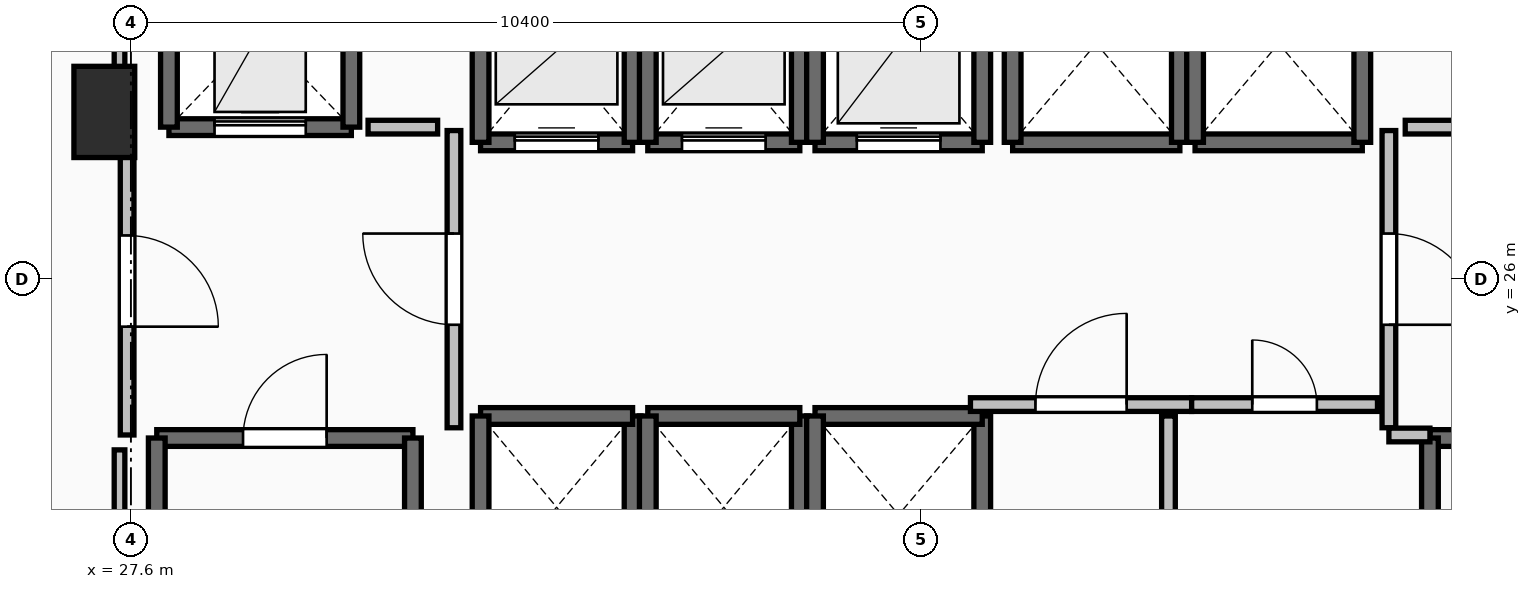
"""IFC4 building model, lengths in metres.
Left out: names, types, materials, properties, quantities, classifications, styles, units other than length and angle.
Written with IfcOpenShell. Run it as: python <this file> out.ifc"""

import sys

from ifc_helpers import new_model, si_unit, direction, frame, frame_2d, origin, origin_2d, place, context, subcontext, project, spatial, rectangle, extrude, element, fill, save


model = new_model("IFC4")
c1 = context("Model", 3, precision=1e-05, world=origin(), true_north=direction((0.0, 1.0)))
c2 = subcontext(c1, "Body", "Model", "MODEL_VIEW")
j1 = project(units=[si_unit("LENGTHUNIT", "METRE"), si_unit("PLANEANGLEUNIT", "RADIAN")], contexts=[c1])
p1 = place(None, origin())
s1 = spatial("IfcSite", under=j1, at=p1, CompositionType="ELEMENT")
p2 = place(p1, origin())
s2 = spatial("IfcBuilding", under=s1, at=p2, CompositionType="ELEMENT")
p3 = place(p2, frame((0.0, 0.0, 19.2)))
s3 = spatial("IfcBuildingStorey", under=s2, at=p3, CompositionType="ELEMENT", Elevation=19.2)
p4 = place(p3, frame((27.25, 28.2, 0.0), z_axis=(0.0, 0.0, 1.0), x_axis=(1.0, 0.0, 0.0)))
e1 = element("IfcColumn", 1, at=p4, inside=s3, PredefinedType="PILASTER", context=c2, shape_type="SweptSolid", body=[
    extrude(rectangle(XDim=0.8, YDim=1.2, at=origin_2d()), origin(), (0.0, 0.0, 1.0), 4.8),
])
p5 = place(p3, frame((27.94, 23.91, 0.0), z_axis=(0.0, 0.0, 1.0), x_axis=(1.0, 0.0, 0.0)))
e2 = element("IfcWall", 2, at=p5, inside=s3, PredefinedType="SOLIDWALL", context=c2, shape_type="SweptSolid", body=[
    extrude(rectangle(XDim=3.37, YDim=0.22, at=frame_2d((1.685, 0.0))), origin(), (0.0, 0.0, 1.0), 4.54),
])
p6 = place(p5, frame((1.135, 0.0, 0.0)))
e3 = element("IfcOpeningElement", 3, at=p6, cuts=e2, PredefinedType="OPENING", context=c2, shape_type="SweptSolid", body=[
    extrude(rectangle(XDim=1.1, YDim=2.15, at=frame_2d((0.55, 1.075))), frame((0.0, 0.125, 0.0), z_axis=(0.0, -1.0, 0.0), x_axis=(1.0, 0.0, 0.0)), (0.0, 0.0, 1.0), 0.25),
])
for number, where, z_axis, x_axis in (
    (4, (31.31, 23.91, 0.0), (0.0, 0.0, 1.0), (0.0, -1.0, 0.0)),
    (5, (27.94, 16.49, 0.0), (0.0, 0.0, 1.0), (0.0, 1.0, 0.0)),
):
    element("IfcWall", number, at=place(p3, frame(where, z_axis=z_axis, x_axis=x_axis)), inside=s3, PredefinedType="SOLIDWALL", context=c2, shape_type="SweptSolid", body=[
        extrude(rectangle(XDim=7.42, YDim=0.22, at=frame_2d((3.71, 0.0))), origin(), (0.0, 0.0, 1.0), 4.54),
    ])
p7 = place(p3, frame((44.69, 23.91, 0.0), z_axis=(0.0, 0.0, 1.0), x_axis=(1.0, 0.0, 0.0)))
e6 = element("IfcWall", 6, at=p7, inside=s3, PredefinedType="SOLIDWALL", context=c2, shape_type="SweptSolid", body=[
    extrude(rectangle(XDim=3.37, YDim=0.22, at=frame_2d((1.685, 0.0))), origin(), (0.0, 0.0, 1.0), 4.54),
])
p8 = place(p7, frame((1.135, 0.0, 0.0)))
e7 = element("IfcOpeningElement", 7, at=p8, cuts=e6, PredefinedType="OPENING", context=c2, shape_type="SweptSolid", body=[
    extrude(rectangle(XDim=1.1, YDim=2.15, at=frame_2d((0.55, 1.075))), frame((0.0, 0.125, 0.0), z_axis=(0.0, -1.0, 0.0), x_axis=(1.0, 0.0, 0.0)), (0.0, 0.0, 1.0), 0.25),
])
p9 = place(p3, frame((44.69, 16.49, 0.0), z_axis=(0.0, 0.0, 1.0), x_axis=(0.0, 1.0, 0.0)))
e8 = element("IfcWall", 8, at=p9, inside=s3, PredefinedType="SOLIDWALL", context=c2, shape_type="SweptSolid", body=[
    extrude(rectangle(XDim=7.42, YDim=0.22, at=frame_2d((3.71, 0.0))), origin(), (0.0, 0.0, 1.0), 4.54),
])
p10 = place(p3, frame((32.2, 27.8, 0.0), z_axis=(0.0, 0.0, 1.0), x_axis=(1.0, 0.0, 0.0)))
e9 = element("IfcWall", 9, at=p10, inside=s3, PredefinedType="SOLIDWALL", context=c2, shape_type="SweptSolid", body=[
    extrude(rectangle(XDim=2.0, YDim=0.22, at=frame_2d((1.0, 0.0))), origin(), (0.0, 0.0, 1.0), 4.54),
])
p11 = place(p10, frame((0.45, 0.0, 0.0)))
e10 = element("IfcOpeningElement", 10, at=p11, cuts=e9, PredefinedType="OPENING", context=c2, shape_type="SweptSolid", body=[
    extrude(rectangle(XDim=1.1, YDim=2.2, at=frame_2d((0.55, 1.1))), frame((0.0, 0.125, 0.0), z_axis=(0.0, -1.0, 0.0), x_axis=(1.0, 0.0, 0.0)), (0.0, 0.0, 1.0), 0.25),
])
for number, where, z_axis, x_axis in (
    (11, (34.2, 27.8, 0.0), (0.0, 0.0, 1.0), (0.0, 1.0, 0.0)),
    (12, (32.2, 30.2, 0.0), (0.0, 0.0, 1.0), (0.0, -1.0, 0.0)),
):
    element("IfcWall", number, at=place(p3, frame(where, z_axis=z_axis, x_axis=x_axis)), inside=s3, PredefinedType="SOLIDWALL", context=c2, shape_type="SweptSolid", body=[
        extrude(rectangle(XDim=2.4, YDim=0.22, at=frame_2d((1.2, 0.0))), origin(), (0.0, 0.0, 1.0), 4.54),
    ])
p12 = place(p3, frame((34.4, 27.8, 0.0), z_axis=(0.0, 0.0, 1.0), x_axis=(1.0, 0.0, 0.0)))
e13 = element("IfcWall", 13, at=p12, inside=s3, PredefinedType="SOLIDWALL", context=c2, shape_type="SweptSolid", body=[
    extrude(rectangle(XDim=2.0, YDim=0.22, at=frame_2d((1.0, 0.0))), origin(), (0.0, 0.0, 1.0), 4.54),
])
p13 = place(p12, frame((0.45, 0.0, 0.0)))
e14 = element("IfcOpeningElement", 14, at=p13, cuts=e13, PredefinedType="OPENING", context=c2, shape_type="SweptSolid", body=[
    extrude(rectangle(XDim=1.1, YDim=2.2, at=frame_2d((0.55, 1.1))), frame((0.0, 0.125, 0.0), z_axis=(0.0, -1.0, 0.0), x_axis=(1.0, 0.0, 0.0)), (0.0, 0.0, 1.0), 0.25),
])
for number, where, z_axis, x_axis in (
    (15, (36.4, 27.8, 0.0), (0.0, 0.0, 1.0), (0.0, 1.0, 0.0)),
    (16, (34.4, 30.2, 0.0), (0.0, 0.0, 1.0), (0.0, -1.0, 0.0)),
):
    element("IfcWall", number, at=place(p3, frame(where, z_axis=z_axis, x_axis=x_axis)), inside=s3, PredefinedType="SOLIDWALL", context=c2, shape_type="SweptSolid", body=[
        extrude(rectangle(XDim=2.4, YDim=0.22, at=frame_2d((1.2, 0.0))), origin(), (0.0, 0.0, 1.0), 4.54),
    ])
p14 = place(p3, frame((36.6, 27.8, 0.0), z_axis=(0.0, 0.0, 1.0), x_axis=(1.0, 0.0, 0.0)))
e17 = element("IfcWall", 17, at=p14, inside=s3, PredefinedType="SOLIDWALL", context=c2, shape_type="SweptSolid", body=[
    extrude(rectangle(XDim=2.2, YDim=0.22, at=frame_2d((1.1, 0.0))), origin(), (0.0, 0.0, 1.0), 4.54),
])
p15 = place(p14, frame((0.55, 0.0, 0.0)))
e18 = element("IfcOpeningElement", 18, at=p15, cuts=e17, PredefinedType="OPENING", context=c2, shape_type="SweptSolid", body=[
    extrude(rectangle(XDim=1.1, YDim=2.2, at=frame_2d((0.55, 1.1))), frame((0.0, 0.125, 0.0), z_axis=(0.0, -1.0, 0.0), x_axis=(1.0, 0.0, 0.0)), (0.0, 0.0, 1.0), 0.25),
])
for number, where, z_axis, x_axis in (
    (19, (38.8, 27.8, 0.0), (0.0, 0.0, 1.0), (0.0, 1.0, 0.0)),
    (20, (36.6, 30.4, 0.0), (0.0, 0.0, 1.0), (0.0, -1.0, 0.0)),
):
    element("IfcWall", number, at=place(p3, frame(where, z_axis=z_axis, x_axis=x_axis)), inside=s3, PredefinedType="SOLIDWALL", context=c2, shape_type="SweptSolid", body=[
        extrude(rectangle(XDim=2.6, YDim=0.22, at=frame_2d((1.3, 0.0))), origin(), (0.0, 0.0, 1.0), 4.54),
    ])
p16 = place(p3, frame((34.2, 21.8, 0.0), z_axis=(0.0, 0.0, 1.0), x_axis=(0.0, 1.0, 0.0)))
e21 = element("IfcWall", 21, at=p16, inside=s3, PredefinedType="SOLIDWALL", context=c2, shape_type="SweptSolid", body=[
    extrude(rectangle(XDim=2.4, YDim=0.22, at=frame_2d((1.2, 0.0))), origin(), (0.0, 0.0, 1.0), 4.54),
])
p17 = place(p3, frame((34.2, 24.2, 0.0), z_axis=(0.0, 0.0, 1.0), x_axis=(-1.0, 0.0, 0.0)))
e22 = element("IfcWall", 22, at=p17, inside=s3, PredefinedType="SOLIDWALL", context=c2, shape_type="SweptSolid", body=[
    extrude(rectangle(XDim=2.0, YDim=0.22, at=frame_2d((1.0, 0.0))), origin(), (0.0, 0.0, 1.0), 4.54),
])
for number, where, z_axis, x_axis in (
    (23, (32.2, 24.2, 0.0), (0.0, 0.0, 1.0), (0.0, -1.0, 0.0)),
    (24, (36.4, 21.8, 0.0), (0.0, 0.0, 1.0), (0.0, 1.0, 0.0)),
):
    element("IfcWall", number, at=place(p3, frame(where, z_axis=z_axis, x_axis=x_axis)), inside=s3, PredefinedType="SOLIDWALL", context=c2, shape_type="SweptSolid", body=[
        extrude(rectangle(XDim=2.4, YDim=0.22, at=frame_2d((1.2, 0.0))), origin(), (0.0, 0.0, 1.0), 4.54),
    ])
p18 = place(p3, frame((36.4, 24.2, 0.0), z_axis=(0.0, 0.0, 1.0), x_axis=(-1.0, 0.0, 0.0)))
e25 = element("IfcWall", 25, at=p18, inside=s3, PredefinedType="SOLIDWALL", context=c2, shape_type="SweptSolid", body=[
    extrude(rectangle(XDim=2.0, YDim=0.22, at=frame_2d((1.0, 0.0))), origin(), (0.0, 0.0, 1.0), 4.54),
])
p19 = place(p3, frame((34.4, 24.2, 0.0), z_axis=(0.0, 0.0, 1.0), x_axis=(0.0, -1.0, 0.0)))
e26 = element("IfcWall", 26, at=p19, inside=s3, PredefinedType="SOLIDWALL", context=c2, shape_type="SweptSolid", body=[
    extrude(rectangle(XDim=2.4, YDim=0.22, at=frame_2d((1.2, 0.0))), origin(), (0.0, 0.0, 1.0), 4.54),
])
p20 = place(p3, frame((38.8, 21.6, 0.0), z_axis=(0.0, 0.0, 1.0), x_axis=(0.0, 1.0, 0.0)))
e27 = element("IfcWall", 27, at=p20, inside=s3, PredefinedType="SOLIDWALL", context=c2, shape_type="SweptSolid", body=[
    extrude(rectangle(XDim=2.6, YDim=0.22, at=frame_2d((1.3, 0.0))), origin(), (0.0, 0.0, 1.0), 4.54),
])
p21 = place(p3, frame((38.8, 24.2, 0.0), z_axis=(0.0, 0.0, 1.0), x_axis=(-1.0, 0.0, 0.0)))
e28 = element("IfcWall", 28, at=p21, inside=s3, PredefinedType="SOLIDWALL", context=c2, shape_type="SweptSolid", body=[
    extrude(rectangle(XDim=2.2, YDim=0.22, at=frame_2d((1.1, 0.0))), origin(), (0.0, 0.0, 1.0), 4.54),
])
p22 = place(p3, frame((36.6, 24.2, 0.0), z_axis=(0.0, 0.0, 1.0), x_axis=(0.0, -1.0, 0.0)))
e29 = element("IfcWall", 29, at=p22, inside=s3, PredefinedType="SOLIDWALL", context=c2, shape_type="SweptSolid", body=[
    extrude(rectangle(XDim=2.6, YDim=0.22, at=frame_2d((1.3, 0.0))), origin(), (0.0, 0.0, 1.0), 4.54),
])
p23 = place(p3, frame((39.2, 27.8, 0.0), z_axis=(0.0, 0.0, 1.0), x_axis=(1.0, 0.0, 0.0)))
e30 = element("IfcWall", 30, at=p23, inside=s3, PredefinedType="SOLIDWALL", context=c2, shape_type="SweptSolid", body=[
    extrude(rectangle(XDim=2.2, YDim=0.22, at=frame_2d((1.1, 0.0))), origin(), (0.0, 0.0, 1.0), 4.54),
])
for number, where, z_axis, x_axis in (
    (31, (41.4, 27.8, 0.0), (0.0, 0.0, 1.0), (0.0, 1.0, 0.0)),
    (32, (39.2, 30.4, 0.0), (0.0, 0.0, 1.0), (0.0, -1.0, 0.0)),
):
    element("IfcWall", number, at=place(p3, frame(where, z_axis=z_axis, x_axis=x_axis)), inside=s3, PredefinedType="SOLIDWALL", context=c2, shape_type="SweptSolid", body=[
        extrude(rectangle(XDim=2.6, YDim=0.22, at=frame_2d((1.3, 0.0))), origin(), (0.0, 0.0, 1.0), 4.54),
    ])
p24 = place(p3, frame((41.6, 27.8, 0.0), z_axis=(0.0, 0.0, 1.0), x_axis=(1.0, 0.0, 0.0)))
e33 = element("IfcWall", 33, at=p24, inside=s3, PredefinedType="SOLIDWALL", context=c2, shape_type="SweptSolid", body=[
    extrude(rectangle(XDim=2.2, YDim=0.22, at=frame_2d((1.1, 0.0))), origin(), (0.0, 0.0, 1.0), 4.54),
])
for number, where, z_axis, x_axis in (
    (34, (43.8, 27.8, 0.0), (0.0, 0.0, 1.0), (0.0, 1.0, 0.0)),
    (35, (41.6, 30.4, 0.0), (0.0, 0.0, 1.0), (0.0, -1.0, 0.0)),
):
    element("IfcWall", number, at=place(p3, frame(where, z_axis=z_axis, x_axis=x_axis)), inside=s3, PredefinedType="SOLIDWALL", context=c2, shape_type="SweptSolid", body=[
        extrude(rectangle(XDim=2.6, YDim=0.22, at=frame_2d((1.3, 0.0))), origin(), (0.0, 0.0, 1.0), 4.54),
    ])
p25 = place(p3, frame((28.1, 28.0, 0.0), z_axis=(0.0, 0.0, 1.0), x_axis=(1.0, 0.0, 0.0)))
e36 = element("IfcWall", 36, at=p25, inside=s3, PredefinedType="SHEAR", context=c2, shape_type="SweptSolid", body=[
    extrude(rectangle(XDim=2.4, YDim=0.22, at=frame_2d((1.2, 0.0))), origin(), (0.0, 0.0, 1.0), 4.54),
])
p26 = place(p25, frame((0.6, 0.0, 0.0)))
e37 = element("IfcOpeningElement", 37, at=p26, cuts=e36, PredefinedType="OPENING", context=c2, shape_type="SweptSolid", body=[
    extrude(rectangle(XDim=1.2, YDim=2.2, at=frame_2d((0.6, 1.1))), frame((0.0, 0.125, 0.0), z_axis=(0.0, -1.0, 0.0), x_axis=(1.0, 0.0, 0.0)), (0.0, 0.0, 1.0), 0.25),
])
for number, where, z_axis, x_axis in (
    (38, (30.5, 28.0, 0.0), (0.0, 0.0, 1.0), (0.0, 1.0, 0.0)),
    (39, (28.1, 30.5, 0.0), (0.0, 0.0, 1.0), (0.0, -1.0, 0.0)),
):
    element("IfcWall", number, at=place(p3, frame(where, z_axis=z_axis, x_axis=x_axis)), inside=s3, PredefinedType="SHEAR", context=c2, shape_type="SweptSolid", body=[
        extrude(rectangle(XDim=2.5, YDim=0.22, at=frame_2d((1.25, 0.0))), origin(), (0.0, 0.0, 1.0), 4.54),
    ])
p27 = place(p3, frame((31.85, 24.045, 0.0), z_axis=(0.0, 0.0, 1.0), x_axis=(0.0, 1.0, 0.0)))
e40 = element("IfcWall", 40, at=p27, inside=s3, PredefinedType="PARTITIONING", context=c2, shape_type="SweptSolid", body=[
    extrude(rectangle(XDim=3.91, YDim=0.18, at=frame_2d((1.955, 0.0))), origin(), (0.0, 0.0, 1.0), 4.54),
])
p28 = place(p27, frame((1.355, 0.0, 0.0)))
e41 = element("IfcOpeningElement", 41, at=p28, cuts=e40, PredefinedType="OPENING", context=c2, shape_type="SweptSolid", body=[
    extrude(rectangle(XDim=1.2, YDim=2.15, at=frame_2d((0.6, 1.075))), frame((0.0, 0.105, 0.0), z_axis=(0.0, -1.0, 0.0), x_axis=(1.0, 0.0, 0.0)), (0.0, 0.0, 1.0), 0.21),
])
p29 = place(p3, frame((27.55, 28.0, 0.0), z_axis=(0.0, 0.0, 1.0), x_axis=(0.0, -1.0, 0.0)))
e42 = element("IfcWall", 42, at=p29, inside=s3, PredefinedType="PARTITIONING", context=c2, shape_type="SweptSolid", body=[
    extrude(rectangle(XDim=4.05, YDim=0.18, at=frame_2d((2.025, 0.0))), origin(), (0.0, 0.0, 1.0), 4.54),
])
p30 = place(p29, frame((1.425, 0.0, 0.0)))
e43 = element("IfcOpeningElement", 43, at=p30, cuts=e42, PredefinedType="OPENING", context=c2, shape_type="SweptSolid", body=[
    extrude(rectangle(XDim=1.2, YDim=2.15, at=frame_2d((0.6, 1.075))), frame((0.0, 0.105, 0.0), z_axis=(0.0, -1.0, 0.0), x_axis=(1.0, 0.0, 0.0)), (0.0, 0.0, 1.0), 0.21),
])
p31 = place(p3, frame((44.15, 27.955, 0.0), z_axis=(0.0, 0.0, 1.0), x_axis=(0.0, -1.0, 0.0)))
e44 = element("IfcWall", 44, at=p31, inside=s3, PredefinedType="PARTITIONING", context=c2, shape_type="SweptSolid", body=[
    extrude(rectangle(XDim=3.91, YDim=0.18, at=frame_2d((1.955, 0.0))), origin(), (0.0, 0.0, 1.0), 4.54),
])
p32 = place(p31, frame((1.355, 0.0, 0.0)))
e45 = element("IfcOpeningElement", 45, at=p32, cuts=e44, PredefinedType="OPENING", context=c2, shape_type="SweptSolid", body=[
    extrude(rectangle(XDim=1.2, YDim=2.15, at=frame_2d((0.6, 1.075))), frame((0.0, 0.105, 0.0), z_axis=(0.0, -1.0, 0.0), x_axis=(1.0, 0.0, 0.0)), (0.0, 0.0, 1.0), 0.21),
])
p33 = place(p3, frame((44.15, 23.95, 0.0), z_axis=(0.0, 0.0, 1.0), x_axis=(1.0, 0.0, 0.0)))
e46 = element("IfcWall", 46, at=p33, inside=s3, PredefinedType="PARTITIONING", context=c2, shape_type="SweptSolid", body=[
    extrude(rectangle(XDim=0.54, YDim=0.18, at=frame_2d((0.27, 0.0))), origin(), (0.0, 0.0, 1.0), 4.54),
])
p34 = place(p3, frame((38.645, 24.35, 0.0), z_axis=(0.0, 0.0, 1.0), x_axis=(1.0, 0.0, 0.0)))
e47 = element("IfcWall", 47, at=p34, inside=s3, PredefinedType="PARTITIONING", context=c2, shape_type="SweptSolid", body=[
    extrude(rectangle(XDim=2.91, YDim=0.18, at=frame_2d((1.455, 0.0))), origin(), (0.0, 0.0, 1.0), 4.54),
])
p35 = place(p34, frame((0.855, 0.0, 0.0)))
e48 = element("IfcOpeningElement", 48, at=p35, cuts=e47, PredefinedType="OPENING", context=c2, shape_type="SweptSolid", body=[
    extrude(rectangle(XDim=1.2, YDim=2.15, at=frame_2d((0.6, 1.075))), frame((0.0, 0.105, 0.0), z_axis=(0.0, -1.0, 0.0), x_axis=(1.0, 0.0, 0.0)), (0.0, 0.0, 1.0), 0.21),
])
p36 = place(p3, frame((41.555, 24.35, 0.0), z_axis=(0.0, 0.0, 1.0), x_axis=(1.0, 0.0, 0.0)))
e49 = element("IfcWall", 49, at=p36, inside=s3, PredefinedType="PARTITIONING", context=c2, shape_type="SweptSolid", body=[
    extrude(rectangle(XDim=2.445, YDim=0.18, at=frame_2d((1.223, 0.0))), origin(), (0.0, 0.0, 1.0), 4.54),
])
p37 = place(p36, frame((0.798, 0.0, 0.0)))
e50 = element("IfcOpeningElement", 50, at=p37, cuts=e49, PredefinedType="OPENING", context=c2, shape_type="SweptSolid", body=[
    extrude(rectangle(XDim=0.85, YDim=2.1, at=frame_2d((0.425, 1.05))), frame((0.0, 0.105, 0.0), z_axis=(0.0, -1.0, 0.0), x_axis=(1.0, 0.0, 0.0)), (0.0, 0.0, 1.0), 0.21),
])
p38 = place(p3, frame((41.25, 20.305, 0.0), z_axis=(0.0, 0.0, 1.0), x_axis=(0.0, 1.0, 0.0)))
e51 = element("IfcWall", 51, at=p38, inside=s3, PredefinedType="PARTITIONING", context=c2, shape_type="SweptSolid", body=[
    extrude(rectangle(XDim=3.895, YDim=0.18, at=frame_2d((1.948, 0.0))), origin(), (0.0, 0.0, 1.0), 4.54),
])
p39 = place(p38, frame((1.522, 0.0, 0.0)))
e52 = element("IfcOpeningElement", 52, at=p39, cuts=e51, PredefinedType="OPENING", context=c2, shape_type="SweptSolid", body=[
    extrude(rectangle(XDim=0.85, YDim=2.1, at=frame_2d((0.425, 1.05))), frame((0.0, 0.105, 0.0), z_axis=(0.0, -1.0, 0.0), x_axis=(1.0, 0.0, 0.0)), (0.0, 0.0, 1.0), 0.21),
])
for number, where, z_axis, x_axis in (
    (53, (31.635, 28.0, 0.0), (0.0, 0.0, 1.0), (-1.0, 0.0, 0.0)),
    (54, (45.28, 28.0, 0.0), (0.0, 0.0, 1.0), (-1.0, 0.0, 0.0)),
):
    element("IfcWall", number, at=place(p3, frame(where, z_axis=z_axis, x_axis=x_axis)), inside=s3, PredefinedType="PARTITIONING", context=c2, shape_type="SweptSolid", body=[
        extrude(rectangle(XDim=0.915, YDim=0.18, at=frame_2d((0.458, 0.0))), origin(), (0.0, 0.0, 1.0), 4.54),
    ])
p40 = place(p3, frame((27.45, 16.24, 0.0), z_axis=(0.0, 0.0, 1.0), x_axis=(0.0, 1.0, 0.0)))
e55 = element("IfcWall", 55, at=p40, inside=s3, PredefinedType="PARTITIONING", context=c2, shape_type="SweptSolid", body=[
    extrude(rectangle(XDim=7.514, YDim=0.14, at=frame_2d((3.757, 0.0))), origin(), (0.0, 0.0, 1.0), 3.732),
])
p41 = place(p3, frame((27.45, 28.196, 0.0), z_axis=(0.0, 0.0, 1.0), x_axis=(0.0, 1.0, 0.0)))
e56 = element("IfcWall", 56, at=p41, inside=s3, PredefinedType="PARTITIONING", context=c2, shape_type="SweptSolid", body=[
    extrude(rectangle(XDim=5.254, YDim=0.14, at=frame_2d((2.627, 0.0))), origin(), (0.0, 0.0, 1.0), 3.732),
])
p42 = place(p6, origin())
e57 = element("IfcDoor", 57, at=p42, inside=s3, OperationType="SINGLE_SWING_RIGHT", PredefinedType="DOOR", context=c2, shape_type="SweptSolid", body=[
    extrude(rectangle(XDim=1.1, YDim=2.15, at=frame_2d((0.55, 1.075))), frame((0.0, 0.025, 0.0), z_axis=(0.0, -1.0, 0.0), x_axis=(1.0, 0.0, 0.0)), (0.0, 0.0, 1.0), 0.05),
])
fill(e3, e57)
p43 = place(p11, origin())
e58 = element("IfcDoor", 58, at=p43, inside=s3, OperationType="SLIDING_TO_LEFT", PredefinedType="DOOR", context=c2, shape_type="SweptSolid", body=[
    extrude(rectangle(XDim=1.1, YDim=2.2, at=frame_2d((0.55, 1.1))), frame((0.0, 0.025, 0.0), z_axis=(0.0, -1.0, 0.0), x_axis=(1.0, 0.0, 0.0)), (0.0, 0.0, 1.0), 0.05),
])
fill(e10, e58)
p44 = place(p13, origin())
e59 = element("IfcDoor", 59, at=p44, inside=s3, OperationType="SLIDING_TO_LEFT", PredefinedType="DOOR", context=c2, shape_type="SweptSolid", body=[
    extrude(rectangle(XDim=1.1, YDim=2.2, at=frame_2d((0.55, 1.1))), frame((0.0, 0.025, 0.0), z_axis=(0.0, -1.0, 0.0), x_axis=(1.0, 0.0, 0.0)), (0.0, 0.0, 1.0), 0.05),
])
fill(e14, e59)
p45 = place(p15, origin())
e60 = element("IfcDoor", 60, at=p45, inside=s3, OperationType="SLIDING_TO_LEFT", PredefinedType="DOOR", context=c2, shape_type="SweptSolid", body=[
    extrude(rectangle(XDim=1.1, YDim=2.2, at=frame_2d((0.55, 1.1))), frame((0.0, 0.025, 0.0), z_axis=(0.0, -1.0, 0.0), x_axis=(1.0, 0.0, 0.0)), (0.0, 0.0, 1.0), 0.05),
])
fill(e18, e60)
p46 = place(p26, origin())
e61 = element("IfcDoor", 61, at=p46, inside=s3, OperationType="SLIDING_TO_LEFT", PredefinedType="DOOR", context=c2, shape_type="SweptSolid", body=[
    extrude(rectangle(XDim=1.2, YDim=2.2, at=frame_2d((0.6, 1.1))), frame((0.0, 0.025, 0.0), z_axis=(0.0, -1.0, 0.0), x_axis=(1.0, 0.0, 0.0)), (0.0, 0.0, 1.0), 0.05),
])
fill(e37, e61)
p47 = place(p28, origin())
e62 = element("IfcDoor", 62, at=p47, inside=s3, OperationType="SINGLE_SWING_RIGHT", PredefinedType="DOOR", context=c2, shape_type="SweptSolid", body=[
    extrude(rectangle(XDim=1.2, YDim=2.15, at=frame_2d((0.6, 1.075))), frame((0.0, 0.025, 0.0), z_axis=(0.0, -1.0, 0.0), x_axis=(1.0, 0.0, 0.0)), (0.0, 0.0, 1.0), 0.05),
])
fill(e41, e62)
p48 = place(p30, origin())
e63 = element("IfcDoor", 63, at=p48, inside=s3, OperationType="SINGLE_SWING_RIGHT", PredefinedType="DOOR", context=c2, shape_type="SweptSolid", body=[
    extrude(rectangle(XDim=1.2, YDim=2.15, at=frame_2d((0.6, 1.075))), frame((0.0, 0.025, 0.0), z_axis=(0.0, -1.0, 0.0), x_axis=(1.0, 0.0, 0.0)), (0.0, 0.0, 1.0), 0.05),
])
fill(e43, e63)
p49 = place(p32, origin())
e64 = element("IfcDoor", 64, at=p49, inside=s3, OperationType="SINGLE_SWING_RIGHT", PredefinedType="DOOR", context=c2, shape_type="SweptSolid", body=[
    extrude(rectangle(XDim=1.2, YDim=2.15, at=frame_2d((0.6, 1.075))), frame((0.0, 0.025, 0.0), z_axis=(0.0, -1.0, 0.0), x_axis=(1.0, 0.0, 0.0)), (0.0, 0.0, 1.0), 0.05),
])
fill(e45, e64)
p50 = place(p35, origin())
e65 = element("IfcDoor", 65, at=p50, inside=s3, OperationType="SINGLE_SWING_RIGHT", PredefinedType="DOOR", context=c2, shape_type="SweptSolid", body=[
    extrude(rectangle(XDim=1.2, YDim=2.15, at=frame_2d((0.6, 1.075))), frame((0.0, 0.025, 0.0), z_axis=(0.0, -1.0, 0.0), x_axis=(1.0, 0.0, 0.0)), (0.0, 0.0, 1.0), 0.05),
])
fill(e48, e65)
p51 = place(p37, origin())
e66 = element("IfcDoor", 66, at=p51, inside=s3, OperationType="SINGLE_SWING_LEFT", PredefinedType="DOOR", context=c2, shape_type="SweptSolid", body=[
    extrude(rectangle(XDim=0.85, YDim=2.1, at=frame_2d((0.425, 1.05))), frame((0.0, 0.025, 0.0), z_axis=(0.0, -1.0, 0.0), x_axis=(1.0, 0.0, 0.0)), (0.0, 0.0, 1.0), 0.05),
])
fill(e50, e66)
save(model, sys.argv[1])
